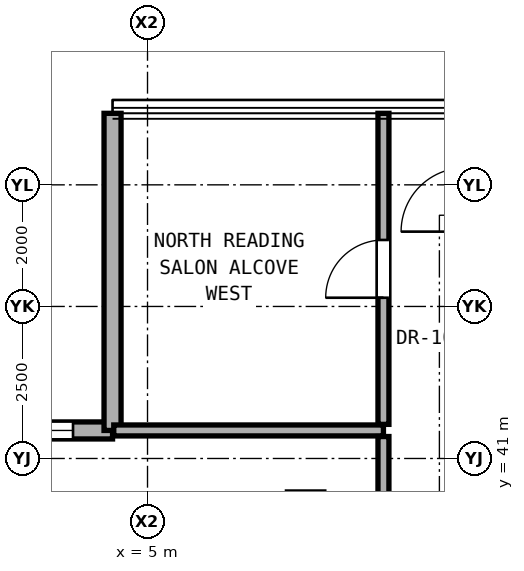
"""IFC4 building model, lengths in metres.
Left out: names, types, materials, properties, quantities, classifications, styles, units other than length and angle.
Written with IfcOpenShell. Run it as: python <this file> out.ifc"""

import sys

from ifc_helpers import new_model, si_unit, direction, frame, frame_2d, origin, place, context, subcontext, project, spatial, rectangle, extrude, element, fill, save


model = new_model("IFC4")
c1 = context("Model", 3, precision=1e-05, world=origin(), true_north=direction((0.0, 1.0)))
c2 = subcontext(c1, "Body", "Model", "MODEL_VIEW")
j1 = project(units=[si_unit("LENGTHUNIT", "METRE"), si_unit("PLANEANGLEUNIT", "RADIAN")], contexts=[c1])
p1 = place(None, origin())
s1 = spatial("IfcSite", under=j1, at=p1, CompositionType="ELEMENT")
p2 = place(p1, origin())
s2 = spatial("IfcBuilding", under=s1, at=p2, CompositionType="ELEMENT")
p3 = place(p2, frame((0.0, 0.0, 206.4)))
s3 = spatial("IfcBuildingStorey", under=s2, at=p3, CompositionType="ELEMENT", Elevation=206.4)
p4 = place(p3, frame((4.425, 41.461, 0.0), z_axis=(0.0, 0.0, 1.0), x_axis=(-1.0, 0.0, 0.0)))
e1 = element("IfcWall", 1, at=p4, inside=s3, PredefinedType="SOLIDWALL", context=c2, shape_type="SweptSolid", body=[
    extrude(rectangle(XDim=5.215, YDim=0.28, at=frame_2d((2.607, 0.0))), origin(), (0.0, 0.0, 1.0), 3.03),
])
p5 = place(p4, frame((0.65, 0.0, 0.85)))
e2 = element("IfcOpeningElement", 2, at=p5, cuts=e1, PredefinedType="OPENING", context=c2, shape_type="SweptSolid", body=[
    extrude(rectangle(XDim=1.1, YDim=2.0, at=frame_2d((0.55, 1.0))), frame((0.0, 0.15, 0.0), z_axis=(0.0, -1.0, 0.0), x_axis=(1.0, 0.0, 0.0)), (0.0, 0.0, 1.0), 0.3),
])
p6 = place(p3, frame((4.425, 46.676, 0.0), z_axis=(0.0, 0.0, 1.0), x_axis=(0.0, -1.0, 0.0)))
e3 = element("IfcWall", 3, at=p6, inside=s3, PredefinedType="SOLIDWALL", context=c2, shape_type="SweptSolid", body=[
    extrude(rectangle(XDim=5.215, YDim=0.28, at=frame_2d((2.607, 0.0))), origin(), (0.0, 0.0, 1.0), 3.03),
])
p7 = place(p3, frame((4.445, 41.461, 0.0), z_axis=(0.0, 0.0, 1.0), x_axis=(1.0, 0.0, 0.0)))
e4 = element("IfcWall", 4, at=p7, inside=s3, PredefinedType="PARTITIONING", context=c2, shape_type="SweptSolid", body=[
    extrude(rectangle(XDim=4.435, YDim=0.18, at=frame_2d((2.217, 0.0))), origin(), (0.0, 0.0, 1.0), 3.05),
])
p8 = place(p3, frame((8.88, 30.82, 0.0), z_axis=(0.0, 0.0, 1.0), x_axis=(0.0, 1.0, 0.0)))
e5 = element("IfcWall", 5, at=p8, inside=s3, PredefinedType="PARTITIONING", context=c2, shape_type="SweptSolid", body=[
    extrude(rectangle(XDim=10.541, YDim=0.18, at=frame_2d((5.271, 0.0))), origin(), (0.0, 0.0, 1.0), 2.346),
])
p9 = place(p8, frame((4.746, 0.0, 0.0)))
e6 = element("IfcOpeningElement", 6, at=p9, cuts=e5, PredefinedType="OPENING", context=c2, shape_type="SweptSolid", body=[
    extrude(rectangle(XDim=1.05, YDim=2.2, at=frame_2d((0.525, 1.1))), frame((0.0, 0.1, 0.0), z_axis=(0.0, -1.0, 0.0), x_axis=(1.0, 0.0, 0.0)), (0.0, 0.0, 1.0), 0.2),
])
p10 = place(p3, frame((8.88, 41.561, 0.0), z_axis=(0.0, 0.0, 1.0), x_axis=(0.0, 1.0, 0.0)))
e7 = element("IfcWall", 7, at=p10, inside=s3, PredefinedType="PARTITIONING", context=c2, shape_type="SweptSolid", body=[
    extrude(rectangle(XDim=5.115, YDim=0.18, at=frame_2d((2.558, 0.0))), origin(), (0.0, 0.0, 1.0), 3.05),
])
p11 = place(p10, frame((2.083, 0.0, 0.0)))
e8 = element("IfcOpeningElement", 8, at=p11, cuts=e7, PredefinedType="OPENING", context=c2, shape_type="SweptSolid", body=[
    extrude(rectangle(XDim=0.95, YDim=2.15, at=frame_2d((0.475, 1.075))), frame((0.0, 0.1, 0.0), z_axis=(0.0, -1.0, 0.0), x_axis=(1.0, 0.0, 0.0)), (0.0, 0.0, 1.0), 0.2),
])
p12 = place(p5, origin())
e9 = element("IfcWindow", 9, at=p12, inside=s3, PartitioningType="SINGLE_PANEL", PredefinedType="WINDOW", context=c2, shape_type="SweptSolid", body=[
    extrude(rectangle(XDim=1.1, YDim=2.0, at=frame_2d((0.55, 1.0))), frame((0.0, 0.03, 0.0), z_axis=(0.0, -1.0, 0.0), x_axis=(1.0, 0.0, 0.0)), (0.0, 0.0, 1.0), 0.06),
])
fill(e2, e9)
p13 = place(p11, origin())
e10 = element("IfcDoor", 10, at=p13, inside=s3, OperationType="SINGLE_SWING_LEFT", PredefinedType="DOOR", context=c2, shape_type="SweptSolid", body=[
    extrude(rectangle(XDim=0.95, YDim=2.15, at=frame_2d((0.475, 1.075))), frame((0.0, 0.025, 0.0), z_axis=(0.0, -1.0, 0.0), x_axis=(1.0, 0.0, 0.0)), (0.0, 0.0, 1.0), 0.05),
])
fill(e8, e10)
save(model, sys.argv[1])
